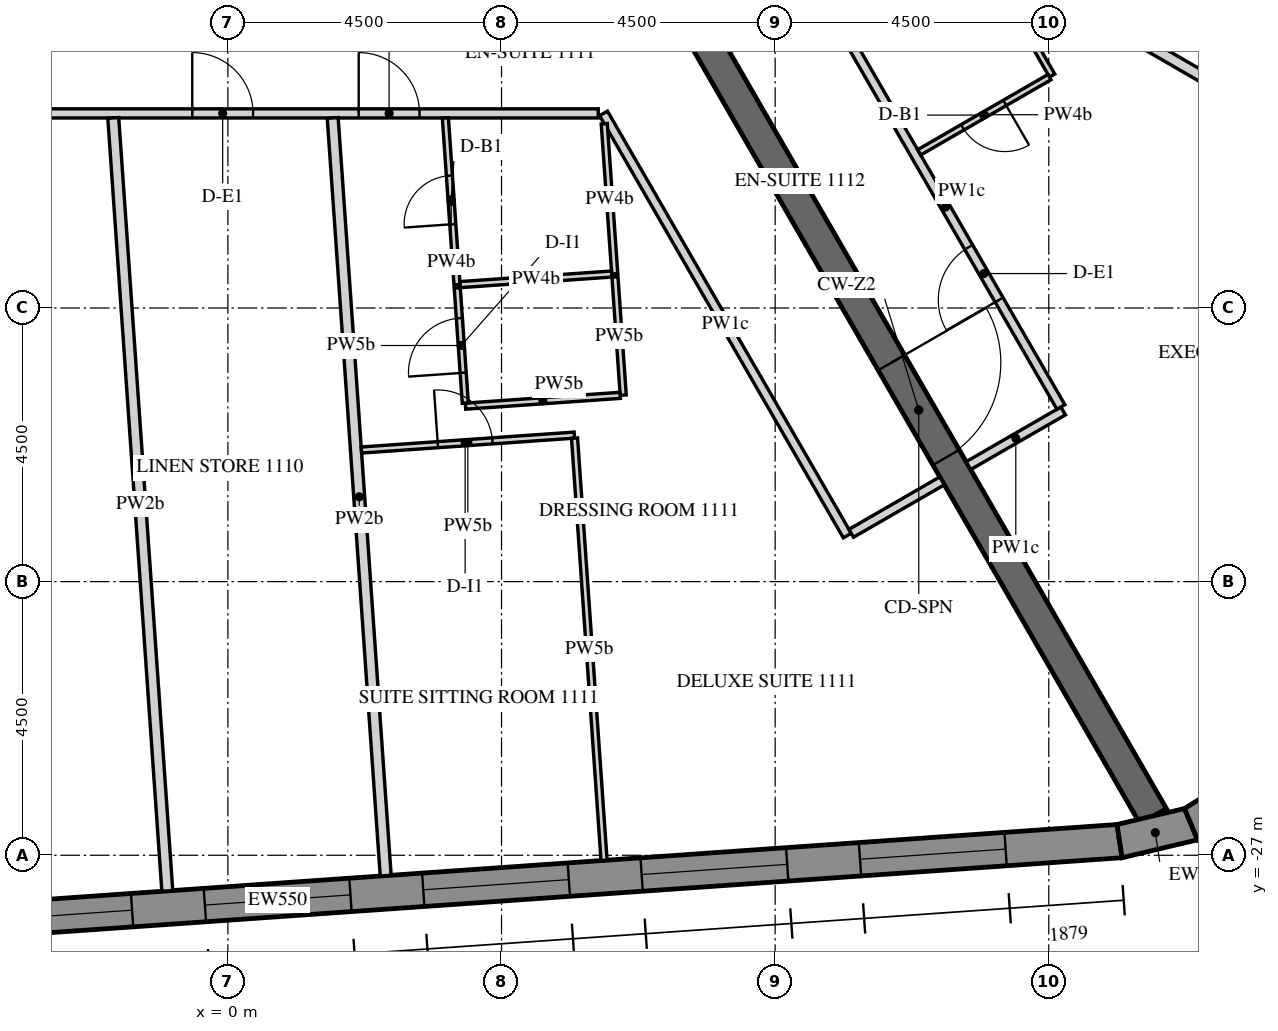
"""IFC4 building model, lengths in metres.
Left out: names, types, materials, properties, quantities, classifications, styles, units other than length and angle.
Written with IfcOpenShell. Run it as: python <this file> out.ifc"""

import sys

from ifc_helpers import new_model, si_unit, direction, frame, frame_2d, origin, place, context, subcontext, project, spatial, polyline, rectangle, outline, extrude, element, fill, save


model = new_model("IFC4")
c1 = context("Model", 3, precision=1e-05, world=origin(), true_north=direction((0.0, 1.0)))
c2 = subcontext(c1, "Body", "Model", "MODEL_VIEW")
j1 = project(units=[si_unit("LENGTHUNIT", "METRE"), si_unit("PLANEANGLEUNIT", "RADIAN")], contexts=[c1])
p1 = place(None, origin())
s1 = spatial("IfcSite", under=j1, at=p1, CompositionType="ELEMENT")
p2 = place(p1, origin())
s2 = spatial("IfcBuilding", under=s1, at=p2, CompositionType="ELEMENT")
p3 = place(p2, frame((0.0, 0.0, 156.6)))
s3 = spatial("IfcBuildingStorey", under=s2, at=p3, CompositionType="ELEMENT", Elevation=156.6)
p4 = place(p3, frame((-13.026, -28.704, -0.15), z_axis=(0.0, 0.0, 1.0), x_axis=(0.99756406806, 0.069756219185, 0.0)))
e1 = element("IfcWall", 1, at=p4, inside=s3, PredefinedType="SOLIDWALL", context=c2, shape_type="SweptSolid", body=[
    extrude(outline(polyline([(-0.026, -0.275), (27.78, -0.275), (27.735, 0.275), (0.026, 0.275), (-0.026, -0.275)])), origin(), (0.0, 0.0, 1.0), 3.9),
])
p5 = place(p4, frame((1.879, 0.0, 1.05)))
e2 = element("IfcOpeningElement", 2, at=p5, cuts=e1, PredefinedType="OPENING", context=c2, shape_type="SweptSolid", body=[
    extrude(rectangle(XDim=2.4, YDim=2.4, at=frame_2d((1.2, 1.2))), frame((0.0, 0.285, 0.0), z_axis=(0.0, -1.0, 0.0), x_axis=(1.0, 0.0, 0.0)), (0.0, 0.0, 1.0), 0.57),
])
p6 = place(p4, frame((5.479, 0.0, 1.05)))
e3 = element("IfcOpeningElement", 3, at=p6, cuts=e1, PredefinedType="OPENING", context=c2, shape_type="SweptSolid", body=[
    extrude(rectangle(XDim=2.4, YDim=2.4, at=frame_2d((1.2, 1.2))), frame((0.0, 0.285, 0.0), z_axis=(0.0, -1.0, 0.0), x_axis=(1.0, 0.0, 0.0)), (0.0, 0.0, 1.0), 0.57),
])
p7 = place(p4, frame((9.079, 0.0, 1.05)))
e4 = element("IfcOpeningElement", 4, at=p7, cuts=e1, PredefinedType="OPENING", context=c2, shape_type="SweptSolid", body=[
    extrude(rectangle(XDim=2.4, YDim=2.4, at=frame_2d((1.2, 1.2))), frame((0.0, 0.285, 0.0), z_axis=(0.0, -1.0, 0.0), x_axis=(1.0, 0.0, 0.0)), (0.0, 0.0, 1.0), 0.57),
])
p8 = place(p4, frame((12.679, 0.0, 1.05)))
e5 = element("IfcOpeningElement", 5, at=p8, cuts=e1, PredefinedType="OPENING", context=c2, shape_type="SweptSolid", body=[
    extrude(rectangle(XDim=2.4, YDim=2.4, at=frame_2d((1.2, 1.2))), frame((0.0, 0.285, 0.0), z_axis=(0.0, -1.0, 0.0), x_axis=(1.0, 0.0, 0.0)), (0.0, 0.0, 1.0), 0.57),
])
p9 = place(p4, frame((16.279, 0.0, 1.05)))
e6 = element("IfcOpeningElement", 6, at=p9, cuts=e1, PredefinedType="OPENING", context=c2, shape_type="SweptSolid", body=[
    extrude(rectangle(XDim=2.4, YDim=2.4, at=frame_2d((1.2, 1.2))), frame((0.0, 0.285, 0.0), z_axis=(0.0, -1.0, 0.0), x_axis=(1.0, 0.0, 0.0)), (0.0, 0.0, 1.0), 0.57),
])
p10 = place(p4, frame((19.879, 0.0, 1.05)))
e7 = element("IfcOpeningElement", 7, at=p10, cuts=e1, PredefinedType="OPENING", context=c2, shape_type="SweptSolid", body=[
    extrude(rectangle(XDim=2.4, YDim=2.4, at=frame_2d((1.2, 1.2))), frame((0.0, 0.285, 0.0), z_axis=(0.0, -1.0, 0.0), x_axis=(1.0, 0.0, 0.0)), (0.0, 0.0, 1.0), 0.57),
])
p11 = place(p4, frame((23.479, 0.0, 1.05)))
e8 = element("IfcOpeningElement", 8, at=p11, cuts=e1, PredefinedType="OPENING", context=c2, shape_type="SweptSolid", body=[
    extrude(rectangle(XDim=2.4, YDim=2.4, at=frame_2d((1.2, 1.2))), frame((0.0, 0.285, 0.0), z_axis=(0.0, -1.0, 0.0), x_axis=(1.0, 0.0, 0.0)), (0.0, 0.0, 1.0), 0.57),
])
p12 = place(p3, frame((14.664, -26.767, -0.15), z_axis=(0.0, 0.0, 1.0), x_axis=(0.973063591128, 0.230536868247, 0.0)))
e9 = element("IfcWall", 9, at=p12, inside=s3, PredefinedType="SOLIDWALL", context=c2, shape_type="SweptSolid", body=[
    extrude(outline(polyline([(-0.022, -0.275), (1.253, -0.275), (1.163, 0.275), (0.022, 0.275), (-0.022, -0.275)])), origin(), (0.0, 0.0, 1.0), 3.9),
])
p13 = place(p3, frame((15.84, -26.489, -0.15), z_axis=(0.0, 0.0, 1.0), x_axis=(0.848009655012, 0.52998077796, 0.0)))
e10 = element("IfcWall", 10, at=p13, inside=s3, PredefinedType="SOLIDWALL", context=c2, shape_type="SweptSolid", body=[
    extrude(outline(polyline([(-0.045, -0.275), (1.253, -0.275), (1.163, 0.275), (0.045, 0.275), (-0.045, -0.275)])), origin(), (0.0, 0.0, 1.0), 3.9),
])
p14 = place(p3, frame((7.506, -13.0, -0.15), z_axis=(0.0, 0.0, 1.0), x_axis=(0.499988271576, -0.866032175087, 0.0)))
e11 = element("IfcWall", 11, at=p14, inside=s3, PredefinedType="SHEAR", context=c2, shape_type="SweptSolid", body=[
    extrude(rectangle(XDim=15.424, YDim=0.5, at=frame_2d((7.712, 0.0))), origin(), (0.0, 0.0, 1.0), 3.9),
])
p15 = place(p14, frame((6.812, 0.0, 0.15)))
e12 = element("IfcOpeningElement", 12, at=p15, cuts=e11, PredefinedType="OPENING", context=c2, shape_type="SweptSolid", body=[
    extrude(rectangle(XDim=1.8, YDim=2.4, at=frame_2d((0.9, 1.2))), frame((0.0, 0.26, 0.0), z_axis=(0.0, -1.0, 0.0), x_axis=(1.0, 0.0, 0.0)), (0.0, 0.0, 1.0), 0.52),
])
p16 = place(p3, frame((-8.458, -14.8, 0.0), z_axis=(0.0, 0.0, 1.0), x_axis=(1.0, 0.0, 0.0)))
e13 = element("IfcWall", 13, at=p16, inside=s3, PredefinedType="PARTITIONING", context=c2, shape_type="SweptSolid", body=[
    extrude(rectangle(XDim=14.549, YDim=0.15, at=frame_2d((7.275, 0.0))), origin(), (0.0, 0.0, 1.0), 2.823),
])
p17 = place(p16, frame((4.375, 0.0, 0.0)))
e14 = element("IfcOpeningElement", 14, at=p17, cuts=e13, PredefinedType="OPENING", context=c2, shape_type="SweptSolid", body=[
    extrude(rectangle(XDim=1.0, YDim=2.1, at=frame_2d((0.5, 1.05))), frame((0.0, 0.085, 0.0), z_axis=(0.0, -1.0, 0.0), x_axis=(1.0, 0.0, 0.0)), (0.0, 0.0, 1.0), 0.17),
])
p18 = place(p16, frame((7.872, 0.0, 0.0)))
e15 = element("IfcOpeningElement", 15, at=p18, cuts=e13, PredefinedType="OPENING", context=c2, shape_type="SweptSolid", body=[
    extrude(rectangle(XDim=1.0, YDim=2.1, at=frame_2d((0.5, 1.05))), frame((0.0, 0.085, 0.0), z_axis=(0.0, -1.0, 0.0), x_axis=(1.0, 0.0, 0.0)), (0.0, 0.0, 1.0), 0.17),
])
p19 = place(p16, frame((10.609, 0.0, 0.0)))
e16 = element("IfcOpeningElement", 16, at=p19, cuts=e13, PredefinedType="OPENING", context=c2, shape_type="SweptSolid", body=[
    extrude(rectangle(XDim=1.0, YDim=2.1, at=frame_2d((0.5, 1.05))), frame((0.0, 0.085, 0.0), z_axis=(0.0, -1.0, 0.0), x_axis=(1.0, 0.0, 0.0)), (0.0, 0.0, 1.0), 0.17),
])
p20 = place(p3, frame((6.178, -14.8, 0.0), z_axis=(0.0, 0.0, 1.0), x_axis=(0.499984309814, -0.866034462328, 0.0)))
e17 = element("IfcWall", 17, at=p20, inside=s3, PredefinedType="PARTITIONING", context=c2, shape_type="SweptSolid", body=[
    extrude(rectangle(XDim=8.017, YDim=0.15, at=frame_2d((4.008, 0.0))), origin(), (0.0, 0.0, 1.0), 2.823),
])
p21 = place(p3, frame((10.251, -21.705, 0.0), z_axis=(0.0, 0.0, 1.0), x_axis=(0.866013532718, 0.500020560727, 0.0)))
e18 = element("IfcWall", 18, at=p21, inside=s3, PredefinedType="PARTITIONING", context=c2, shape_type="SweptSolid", body=[
    extrude(rectangle(XDim=1.725, YDim=0.15, at=frame_2d((0.863, 0.0))), origin(), (0.0, 0.0, 1.0), 2.823),
])
p22 = place(p3, frame((12.178, -20.593, 0.0), z_axis=(0.0, 0.0, 1.0), x_axis=(0.866047807691, 0.499961193289, 0.0)))
e19 = element("IfcWall", 19, at=p22, inside=s3, PredefinedType="PARTITIONING", context=c2, shape_type="SweptSolid", body=[
    extrude(rectangle(XDim=1.8, YDim=0.15, at=frame_2d((0.9, 0.0))), origin(), (0.0, 0.0, 1.0), 2.823),
])
p23 = place(p3, frame((13.699, -19.628, 0.0), z_axis=(0.0, 0.0, 1.0), x_axis=(-0.499998968938, 0.866025999068, 0.0)))
e20 = element("IfcWall", 20, at=p23, inside=s3, PredefinedType="PARTITIONING", context=c2, shape_type="SweptSolid", body=[
    extrude(rectangle(XDim=7.592, YDim=0.15, at=frame_2d((3.796, 0.0))), origin(), (0.0, 0.0, 1.0), 2.823),
])
p24 = place(p23, frame((2.033, 0.0, 0.0)))
e21 = element("IfcOpeningElement", 21, at=p24, cuts=e20, PredefinedType="OPENING", context=c2, shape_type="SweptSolid", body=[
    extrude(rectangle(XDim=1.0, YDim=2.1, at=frame_2d((0.5, 1.05))), frame((0.0, 0.085, 0.0), z_axis=(0.0, -1.0, 0.0), x_axis=(1.0, 0.0, 0.0)), (0.0, 0.0, 1.0), 0.17),
])
p25 = place(p3, frame((-0.996, -27.587, 0.0), z_axis=(0.0, 0.0, 1.0), x_axis=(-0.069758774678, 0.99756388936, 0.0)))
e22 = element("IfcWall", 22, at=p25, inside=s3, PredefinedType="PARTITIONING", context=c2, shape_type="SweptSolid", body=[
    extrude(rectangle(XDim=12.743, YDim=0.18, at=frame_2d((6.371, 0.0))), origin(), (0.0, 0.0, 1.0), 2.823),
])
p26 = place(p3, frame((2.595, -27.335, 0.0), z_axis=(0.0, 0.0, 1.0), x_axis=(-0.069757939761, 0.997563947745, 0.0)))
e23 = element("IfcWall", 23, at=p26, inside=s3, PredefinedType="PARTITIONING", context=c2, shape_type="SweptSolid", body=[
    extrude(rectangle(XDim=12.491, YDim=0.18, at=frame_2d((6.246, 0.0))), origin(), (0.0, 0.0, 1.0), 2.823),
])
p27 = place(p3, frame((3.769, -17.619, 0.0), z_axis=(0.0, 0.0, 1.0), x_axis=(-0.06975229722, 0.997564342302, 0.0)))
e24 = element("IfcWall", 24, at=p27, inside=s3, PredefinedType="PARTITIONING", context=c2, shape_type="SweptSolid", body=[
    extrude(rectangle(XDim=2.751, YDim=0.1, at=frame_2d((1.375, 0.0))), origin(), (0.0, 0.0, 1.0), 2.823),
])
p28 = place(p27, frame((1.0, 0.0, 0.0)))
e25 = element("IfcOpeningElement", 25, at=p28, cuts=e24, PredefinedType="OPENING", context=c2, shape_type="SweptSolid", body=[
    extrude(rectangle(XDim=0.8, YDim=2.1, at=frame_2d((0.4, 1.05))), frame((0.0, 0.06, 0.0), z_axis=(0.0, -1.0, 0.0), x_axis=(1.0, 0.0, 0.0)), (0.0, 0.0, 1.0), 0.12),
])
p29 = place(p3, frame((6.19, -14.971, 0.0), z_axis=(0.0, 0.0, 1.0), x_axis=(0.069689641529, -0.997568721374, 0.0)))
e26 = element("IfcWall", 26, at=p29, inside=s3, PredefinedType="PARTITIONING", context=c2, shape_type="SweptSolid", body=[
    extrude(rectangle(XDim=2.473, YDim=0.1, at=frame_2d((1.237, 0.0))), origin(), (0.0, 0.0, 1.0), 2.823),
])
p30 = place(p3, frame((6.366, -17.488, 0.0), z_axis=(0.0, 0.0, 1.0), x_axis=(0.069743152354, -0.997564981693, 0.0)))
e27 = element("IfcWall", 27, at=p30, inside=s3, PredefinedType="PARTITIONING", context=c2, shape_type="SweptSolid", body=[
    extrude(rectangle(XDim=1.95, YDim=0.1, at=frame_2d((0.975, 0.0))), origin(), (0.0, 0.0, 1.0), 2.823),
])
p31 = place(p3, frame((6.452, -19.437, 0.0), z_axis=(0.0, 0.0, 1.0), x_axis=(-0.997567829494, -0.069702407128, 0.0)))
e28 = element("IfcWall", 28, at=p31, inside=s3, PredefinedType="PARTITIONING", context=c2, shape_type="SweptSolid", body=[
    extrude(rectangle(XDim=2.55, YDim=0.1, at=frame_2d((1.275, 0.0))), origin(), (0.0, 0.0, 1.0), 2.823),
])
p32 = place(p3, frame((3.905, -19.565, 0.0), z_axis=(0.0, 0.0, 1.0), x_axis=(-0.069767755139, 0.997563261324, 0.0)))
e29 = element("IfcWall", 29, at=p32, inside=s3, PredefinedType="PARTITIONING", context=c2, shape_type="SweptSolid", body=[
    extrude(rectangle(XDim=1.9, YDim=0.1, at=frame_2d((0.95, 0.0))), origin(), (0.0, 0.0, 1.0), 2.823),
])
p33 = place(p32, frame((0.5, 0.0, 0.0)))
e30 = element("IfcOpeningElement", 30, at=p33, cuts=e29, PredefinedType="OPENING", context=c2, shape_type="SweptSolid", body=[
    extrude(rectangle(XDim=0.9, YDim=2.1, at=frame_2d((0.45, 1.05))), frame((0.0, 0.06, 0.0), z_axis=(0.0, -1.0, 0.0), x_axis=(1.0, 0.0, 0.0)), (0.0, 0.0, 1.0), 0.12),
])
p34 = place(p3, frame((2.196, -20.336, 0.0), z_axis=(0.0, 0.0, 1.0), x_axis=(0.997563180885, 0.069768905267, 0.0)))
e31 = element("IfcWall", 31, at=p34, inside=s3, PredefinedType="PARTITIONING", context=c2, shape_type="SweptSolid", body=[
    extrude(rectangle(XDim=3.51, YDim=0.1, at=frame_2d((1.755, 0.0))), origin(), (0.0, 0.0, 1.0), 2.823),
])
p35 = place(p34, frame((1.26, 0.0, 0.0)))
e32 = element("IfcOpeningElement", 32, at=p35, cuts=e31, PredefinedType="OPENING", context=c2, shape_type="SweptSolid", body=[
    extrude(rectangle(XDim=0.9, YDim=2.1, at=frame_2d((0.45, 1.05))), frame((0.0, 0.06, 0.0), z_axis=(0.0, -1.0, 0.0), x_axis=(1.0, 0.0, 0.0)), (0.0, 0.0, 1.0), 0.12),
])
p36 = place(p3, frame((5.701, -20.141, 0.0), z_axis=(0.0, 0.0, 1.0), x_axis=(0.069763857423, -0.997563533915, 0.0)))
e33 = element("IfcWall", 33, at=p36, inside=s3, PredefinedType="PARTITIONING", context=c2, shape_type="SweptSolid", body=[
    extrude(rectangle(XDim=6.96, YDim=0.1, at=frame_2d((3.48, 0.0))), origin(), (0.0, 0.0, 1.0), 2.823),
])
p37 = place(p3, frame((3.818, -17.616, 0.0), z_axis=(0.0, 0.0, 1.0), x_axis=(0.99755930726, 0.069824268692, 0.0)))
e34 = element("IfcWall", 34, at=p37, inside=s3, PredefinedType="PARTITIONING", context=c2, shape_type="SweptSolid", body=[
    extrude(rectangle(XDim=2.5, YDim=0.1, at=frame_2d((1.25, 0.0))), origin(), (0.0, 0.0, 1.0), 2.823),
])
p38 = place(p3, frame((12.426, -12.223, 0.0), z_axis=(0.0, 0.0, 1.0), x_axis=(0.499919032186, -0.866072145528, 0.0)))
e35 = element("IfcWall", 35, at=p38, inside=s3, PredefinedType="PARTITIONING", context=c2, shape_type="SweptSolid", body=[
    extrude(rectangle(XDim=2.258, YDim=0.1, at=frame_2d((1.129, 0.0))), origin(), (0.0, 0.0, 1.0), 2.823),
])
p39 = place(p3, frame((13.512, -14.203, 0.0), z_axis=(0.0, 0.0, 1.0), x_axis=(-0.866006523861, -0.500032699561, 0.0)))
e36 = element("IfcWall", 36, at=p39, inside=s3, PredefinedType="PARTITIONING", context=c2, shape_type="SweptSolid", body=[
    extrude(rectangle(XDim=2.475, YDim=0.1, at=frame_2d((1.237, 0.0))), origin(), (0.0, 0.0, 1.0), 2.823),
])
p40 = place(p39, frame((0.85, 0.0, 0.0)))
e37 = element("IfcOpeningElement", 37, at=p40, cuts=e36, PredefinedType="OPENING", context=c2, shape_type="SweptSolid", body=[
    extrude(rectangle(XDim=0.8, YDim=2.1, at=frame_2d((0.4, 1.05))), frame((0.0, 0.06, 0.0), z_axis=(0.0, -1.0, 0.0), x_axis=(1.0, 0.0, 0.0)), (0.0, 0.0, 1.0), 0.12),
])
p41 = place(p3, frame((21.631, -17.433, 0.0), z_axis=(0.0, 0.0, 1.0), x_axis=(-0.866031296205, 0.499989793889, 0.0)))
e38 = element("IfcWall", 38, at=p41, inside=s3, PredefinedType="PARTITIONING", context=c2, shape_type="SweptSolid", body=[
    extrude(rectangle(XDim=11.067, YDim=0.18, at=frame_2d((5.534, 0.0))), origin(), (0.0, 0.0, 1.0), 2.823),
])
p42 = place(p7, frame((0.0, 0.205, 0.0)))
e39 = element("IfcWindow", 39, at=p42, inside=s3, PartitioningType="DOUBLE_PANEL_VERTICAL", PredefinedType="WINDOW", context=c2, shape_type="SweptSolid", body=[
    extrude(rectangle(XDim=2.4, YDim=2.4, at=frame_2d((1.2, 1.2))), frame((0.0, 0.03, 0.0), z_axis=(0.0, -1.0, 0.0), x_axis=(1.0, 0.0, 0.0)), (0.0, 0.0, 1.0), 0.06),
])
fill(e4, e39)
p43 = place(p8, frame((0.0, 0.205, 0.0)))
e40 = element("IfcWindow", 40, at=p43, inside=s3, PartitioningType="DOUBLE_PANEL_VERTICAL", PredefinedType="WINDOW", context=c2, shape_type="SweptSolid", body=[
    extrude(rectangle(XDim=2.4, YDim=2.4, at=frame_2d((1.2, 1.2))), frame((0.0, 0.03, 0.0), z_axis=(0.0, -1.0, 0.0), x_axis=(1.0, 0.0, 0.0)), (0.0, 0.0, 1.0), 0.06),
])
fill(e5, e40)
p44 = place(p9, frame((0.0, 0.205, 0.0)))
e41 = element("IfcWindow", 41, at=p44, inside=s3, PartitioningType="DOUBLE_PANEL_VERTICAL", PredefinedType="WINDOW", context=c2, shape_type="SweptSolid", body=[
    extrude(rectangle(XDim=2.4, YDim=2.4, at=frame_2d((1.2, 1.2))), frame((0.0, 0.03, 0.0), z_axis=(0.0, -1.0, 0.0), x_axis=(1.0, 0.0, 0.0)), (0.0, 0.0, 1.0), 0.06),
])
fill(e6, e41)
p45 = place(p10, frame((0.0, 0.205, 0.0)))
e42 = element("IfcWindow", 42, at=p45, inside=s3, PartitioningType="DOUBLE_PANEL_VERTICAL", PredefinedType="WINDOW", context=c2, shape_type="SweptSolid", body=[
    extrude(rectangle(XDim=2.4, YDim=2.4, at=frame_2d((1.2, 1.2))), frame((0.0, 0.03, 0.0), z_axis=(0.0, -1.0, 0.0), x_axis=(1.0, 0.0, 0.0)), (0.0, 0.0, 1.0), 0.06),
])
fill(e7, e42)
p46 = place(p11, frame((0.0, 0.205, 0.0)))
e43 = element("IfcWindow", 43, at=p46, inside=s3, PartitioningType="DOUBLE_PANEL_VERTICAL", PredefinedType="WINDOW", context=c2, shape_type="SweptSolid", body=[
    extrude(rectangle(XDim=2.4, YDim=2.4, at=frame_2d((1.2, 1.2))), frame((0.0, 0.03, 0.0), z_axis=(0.0, -1.0, 0.0), x_axis=(1.0, 0.0, 0.0)), (0.0, 0.0, 1.0), 0.06),
])
fill(e8, e43)
p47 = place(p15, origin())
e44 = element("IfcDoor", 44, at=p47, inside=s3, OperationType="DOUBLE_DOOR_SINGLE_SWING", PredefinedType="DOOR", context=c2, shape_type="SweptSolid", body=[
    extrude(rectangle(XDim=1.8, YDim=2.4, at=frame_2d((0.9, 1.2))), frame((0.0, 0.025, 0.0), z_axis=(0.0, -1.0, 0.0), x_axis=(1.0, 0.0, 0.0)), (0.0, 0.0, 1.0), 0.05),
])
fill(e12, e44)
p48 = place(p18, origin())
e45 = element("IfcDoor", 45, at=p48, inside=s3, OperationType="SINGLE_SWING_RIGHT", PredefinedType="DOOR", context=c2, shape_type="SweptSolid", body=[
    extrude(rectangle(XDim=1.0, YDim=2.1, at=frame_2d((0.5, 1.05))), frame((0.0, 0.025, 0.0), z_axis=(0.0, -1.0, 0.0), x_axis=(1.0, 0.0, 0.0)), (0.0, 0.0, 1.0), 0.05),
])
fill(e15, e45)
p49 = place(p19, origin())
e46 = element("IfcDoor", 46, at=p49, inside=s3, OperationType="SINGLE_SWING_RIGHT", PredefinedType="DOOR", context=c2, shape_type="SweptSolid", body=[
    extrude(rectangle(XDim=1.0, YDim=2.1, at=frame_2d((0.5, 1.05))), frame((0.0, 0.025, 0.0), z_axis=(0.0, -1.0, 0.0), x_axis=(1.0, 0.0, 0.0)), (0.0, 0.0, 1.0), 0.05),
])
fill(e16, e46)
p50 = place(p28, origin())
e47 = element("IfcDoor", 47, at=p50, inside=s3, OperationType="SINGLE_SWING_RIGHT", PredefinedType="DOOR", context=c2, shape_type="SweptSolid", body=[
    extrude(rectangle(XDim=0.8, YDim=2.1, at=frame_2d((0.4, 1.05))), frame((0.0, 0.025, 0.0), z_axis=(0.0, -1.0, 0.0), x_axis=(1.0, 0.0, 0.0)), (0.0, 0.0, 1.0), 0.05),
])
fill(e25, e47)
p51 = place(p33, origin())
e48 = element("IfcDoor", 48, at=p51, inside=s3, OperationType="SINGLE_SWING_RIGHT", PredefinedType="DOOR", context=c2, shape_type="SweptSolid", body=[
    extrude(rectangle(XDim=0.9, YDim=2.1, at=frame_2d((0.45, 1.05))), frame((0.0, 0.025, 0.0), z_axis=(0.0, -1.0, 0.0), x_axis=(1.0, 0.0, 0.0)), (0.0, 0.0, 1.0), 0.05),
])
fill(e30, e48)
p52 = place(p35, origin())
e49 = element("IfcDoor", 49, at=p52, inside=s3, OperationType="SINGLE_SWING_RIGHT", PredefinedType="DOOR", context=c2, shape_type="SweptSolid", body=[
    extrude(rectangle(XDim=0.9, YDim=2.1, at=frame_2d((0.45, 1.05))), frame((0.0, 0.025, 0.0), z_axis=(0.0, -1.0, 0.0), x_axis=(1.0, 0.0, 0.0)), (0.0, 0.0, 1.0), 0.05),
])
fill(e32, e49)
p53 = place(p24, origin())
e50 = element("IfcDoor", 50, at=p53, inside=s3, OperationType="SINGLE_SWING_LEFT", PredefinedType="DOOR", context=c2, shape_type="SweptSolid", body=[
    extrude(rectangle(XDim=1.0, YDim=2.1, at=frame_2d((0.5, 1.05))), frame((0.0, 0.025, 0.0), z_axis=(0.0, -1.0, 0.0), x_axis=(1.0, 0.0, 0.0)), (0.0, 0.0, 1.0), 0.05),
])
fill(e21, e50)
p54 = place(p40, origin())
e51 = element("IfcDoor", 51, at=p54, inside=s3, OperationType="SINGLE_SWING_RIGHT", PredefinedType="DOOR", context=c2, shape_type="SweptSolid", body=[
    extrude(rectangle(XDim=0.8, YDim=2.1, at=frame_2d((0.4, 1.05))), frame((0.0, 0.025, 0.0), z_axis=(0.0, -1.0, 0.0), x_axis=(1.0, 0.0, 0.0)), (0.0, 0.0, 1.0), 0.05),
])
fill(e37, e51)
save(model, sys.argv[1])
